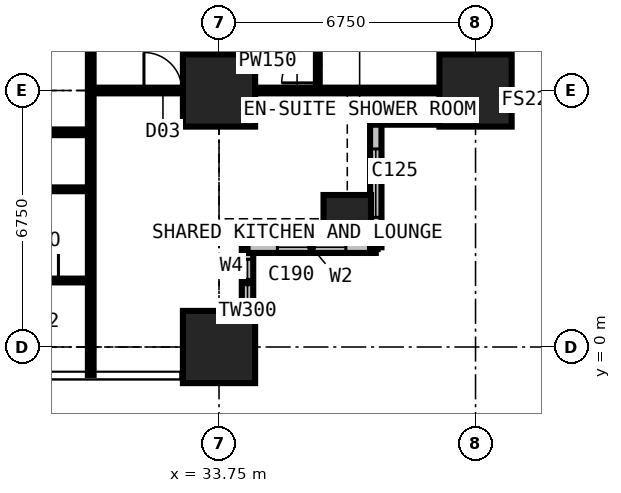
"""IFC4 building model, lengths in metres.
Left out: names, types, materials, properties, quantities, classifications, styles, units other than length and angle.
Written with IfcOpenShell. Run it as: python <this file> out.ifc"""

import sys

from ifc_helpers import new_model, si_unit, direction, frame, frame_2d, origin, origin_2d, place, context, subcontext, project, spatial, rectangle, extrude, element, fill, save


model = new_model("IFC4")
c1 = context("Model", 3, precision=1e-05, world=origin(), true_north=direction((0.0, 1.0)))
c2 = subcontext(c1, "Body", "Model", "MODEL_VIEW")
j1 = project(units=[si_unit("LENGTHUNIT", "METRE"), si_unit("PLANEANGLEUNIT", "RADIAN")], contexts=[c1])
p1 = place(None, origin())
s1 = spatial("IfcSite", under=j1, at=p1, CompositionType="ELEMENT")
p2 = place(p1, origin())
s2 = spatial("IfcBuilding", under=s1, at=p2, CompositionType="ELEMENT")
p3 = place(p2, frame((0.0, 0.0, 32.4)))
s3 = spatial("IfcBuildingStorey", under=s2, at=p3, CompositionType="ELEMENT", Elevation=32.4)
for number, where, z_axis, x_axis in (
    (1, (33.75, 0.0, 0.0), (0.0, 0.0, 1.0), (1.0, 0.0, 0.0)),
    (2, (33.75, 6.75, 0.0), (0.0, 0.0, 1.0), (1.0, 0.0, 0.0)),
):
    element("IfcColumn", number, at=place(p3, frame(where, z_axis=z_axis, x_axis=x_axis)), inside=s3, PredefinedType="COLUMN", context=c2, shape_type="SweptSolid", body=[
        extrude(rectangle(XDim=1.9, YDim=1.9, at=origin_2d()), origin(), (0.0, 0.0, 1.0), 3.6),
    ])
p4 = place(p3, frame((37.125, 3.375, 0.0), z_axis=(0.0, 0.0, 1.0), x_axis=(1.0, 0.0, 0.0)))
e3 = element("IfcColumn", 3, at=p4, inside=s3, PredefinedType="COLUMN", context=c2, shape_type="SweptSolid", body=[
    extrude(rectangle(XDim=1.25, YDim=1.25, at=origin_2d()), origin(), (0.0, 0.0, 1.0), 3.6),
])
p5 = place(p3, frame((40.5, 6.75, 0.0), z_axis=(0.0, 0.0, 1.0), x_axis=(1.0, 0.0, 0.0)))
e4 = element("IfcColumn", 4, at=p5, inside=s3, PredefinedType="COLUMN", context=c2, shape_type="SweptSolid", body=[
    extrude(rectangle(XDim=1.9, YDim=1.9, at=origin_2d()), origin(), (0.0, 0.0, 1.0), 3.6),
])
p6 = place(p3, frame((34.5, -0.75, 0.0), z_axis=(0.0, 0.0, 1.0), x_axis=(0.0, 1.0, 0.0)))
e5 = element("IfcWall", 5, at=p6, inside=s3, PredefinedType="SOLIDWALL", context=c2, shape_type="SweptSolid", body=[
    extrude(rectangle(XDim=3.375, YDim=0.3, at=frame_2d((1.688, 0.0))), origin(), (0.0, 0.0, 1.0), 3.375),
])
p7 = place(p6, frame((1.857, 0.0, 0.9)))
e6 = element("IfcOpeningElement", 6, at=p7, cuts=e5, PredefinedType="OPENING", context=c2, shape_type="SweptSolid", body=[
    extrude(rectangle(XDim=1.2, YDim=1.8, at=frame_2d((0.6, 0.9))), frame((0.0, 0.16, 0.0), z_axis=(0.0, -1.0, 0.0), x_axis=(1.0, 0.0, 0.0)), (0.0, 0.0, 1.0), 0.32),
])
p8 = place(p3, frame((34.5, 2.625, 0.0), z_axis=(0.0, 0.0, 1.0), x_axis=(1.0, 0.0, 0.0)))
e7 = element("IfcWall", 7, at=p8, inside=s3, PredefinedType="SOLIDWALL", context=c2, shape_type="SweptSolid", body=[
    extrude(rectangle(XDim=3.375, YDim=0.3, at=frame_2d((1.688, 0.0))), origin(), (0.0, 0.0, 1.0), 3.375),
])
p9 = place(p8, frame((0.788, 0.0, 0.6)))
e8 = element("IfcOpeningElement", 8, at=p9, cuts=e7, PredefinedType="OPENING", context=c2, shape_type="SweptSolid", body=[
    extrude(rectangle(XDim=1.8, YDim=2.1, at=frame_2d((0.9, 1.05))), frame((0.0, 0.16, 0.0), z_axis=(0.0, -1.0, 0.0), x_axis=(1.0, 0.0, 0.0)), (0.0, 0.0, 1.0), 0.32),
])
p10 = place(p3, frame((37.875, 2.625, 0.0), z_axis=(0.0, 0.0, 1.0), x_axis=(0.0, 1.0, 0.0)))
e9 = element("IfcWall", 9, at=p10, inside=s3, PredefinedType="SOLIDWALL", context=c2, shape_type="SweptSolid", body=[
    extrude(rectangle(XDim=3.375, YDim=0.3, at=frame_2d((1.688, 0.0))), origin(), (0.0, 0.0, 1.0), 3.375),
])
p11 = place(p10, frame((0.788, 0.0, 0.6)))
e10 = element("IfcOpeningElement", 10, at=p11, cuts=e9, PredefinedType="OPENING", context=c2, shape_type="SweptSolid", body=[
    extrude(rectangle(XDim=1.8, YDim=2.1, at=frame_2d((0.9, 1.05))), frame((0.0, 0.16, 0.0), z_axis=(0.0, -1.0, 0.0), x_axis=(1.0, 0.0, 0.0)), (0.0, 0.0, 1.0), 0.32),
])
p12 = place(p3, frame((37.875, 6.0, 0.0), z_axis=(0.0, 0.0, 1.0), x_axis=(1.0, 0.0, 0.0)))
e11 = element("IfcWall", 11, at=p12, inside=s3, PredefinedType="SOLIDWALL", context=c2, shape_type="SweptSolid", body=[
    extrude(rectangle(XDim=3.375, YDim=0.3, at=frame_2d((1.688, 0.0))), origin(), (0.0, 0.0, 1.0), 3.375),
])
p13 = place(p12, frame((0.317, 0.0, 0.9)))
e12 = element("IfcOpeningElement", 12, at=p13, cuts=e11, PredefinedType="OPENING", context=c2, shape_type="SweptSolid", body=[
    extrude(rectangle(XDim=1.2, YDim=1.8, at=frame_2d((0.6, 0.9))), frame((0.0, 0.16, 0.0), z_axis=(0.0, -1.0, 0.0), x_axis=(1.0, 0.0, 0.0)), (0.0, 0.0, 1.0), 0.32),
])
p14 = place(p3, frame((6.75, 4.15, 0.0), z_axis=(0.0, 0.0, 1.0), x_axis=(1.0, 0.0, 0.0)))
e13 = element("IfcWall", 13, at=p14, inside=s3, PredefinedType="PARTITIONING", context=c2, shape_type="SweptSolid", body=[
    extrude(rectangle(XDim=23.625, YDim=0.1, at=frame_2d((11.812, 0.0))), origin(), (0.0, 0.0, 1.0), 3.375),
])
p15 = place(p14, frame((2.85, 0.0, 0.0)))
e14 = element("IfcOpeningElement", 14, at=p15, cuts=e13, PredefinedType="OPENING", context=c2, shape_type="SweptSolid", body=[
    extrude(rectangle(XDim=1.0, YDim=2.2, at=frame_2d((0.5, 1.1))), frame((0.0, 0.06, 0.0), z_axis=(0.0, -1.0, 0.0), x_axis=(1.0, 0.0, 0.0)), (0.0, 0.0, 1.0), 0.12),
])
p16 = place(p14, frame((6.95, 0.0, 0.0)))
e15 = element("IfcOpeningElement", 15, at=p16, cuts=e13, PredefinedType="OPENING", context=c2, shape_type="SweptSolid", body=[
    extrude(rectangle(XDim=0.95, YDim=2.2, at=frame_2d((0.475, 1.1))), frame((0.0, 0.06, 0.0), z_axis=(0.0, -1.0, 0.0), x_axis=(1.0, 0.0, 0.0)), (0.0, 0.0, 1.0), 0.12),
])
p17 = place(p14, frame((10.375, 0.0, 0.0)))
e16 = element("IfcOpeningElement", 16, at=p17, cuts=e13, PredefinedType="OPENING", context=c2, shape_type="SweptSolid", body=[
    extrude(rectangle(XDim=0.95, YDim=2.2, at=frame_2d((0.475, 1.1))), frame((0.0, 0.06, 0.0), z_axis=(0.0, -1.0, 0.0), x_axis=(1.0, 0.0, 0.0)), (0.0, 0.0, 1.0), 0.12),
])
p18 = place(p14, frame((18.475, 0.0, 0.0)))
e17 = element("IfcOpeningElement", 17, at=p18, cuts=e13, PredefinedType="OPENING", context=c2, shape_type="SweptSolid", body=[
    extrude(rectangle(XDim=0.95, YDim=2.2, at=frame_2d((0.475, 1.1))), frame((0.0, 0.06, 0.0), z_axis=(0.0, -1.0, 0.0), x_axis=(1.0, 0.0, 0.0)), (0.0, 0.0, 1.0), 0.12),
])
p19 = place(p14, frame((13.7, 0.0, 0.0)))
e18 = element("IfcOpeningElement", 18, at=p19, cuts=e13, PredefinedType="OPENING", context=c2, shape_type="SweptSolid", body=[
    extrude(rectangle(XDim=0.95, YDim=2.2, at=frame_2d((0.475, 1.1))), frame((0.0, 0.06, 0.0), z_axis=(0.0, -1.0, 0.0), x_axis=(1.0, 0.0, 0.0)), (0.0, 0.0, 1.0), 0.12),
])
p20 = place(p3, frame((22.988, 5.65, 0.0), z_axis=(0.0, 0.0, 1.0), x_axis=(1.0, 0.0, 0.0)))
e19 = element("IfcWall", 19, at=p20, inside=s3, PredefinedType="PARTITIONING", context=c2, shape_type="SweptSolid", body=[
    extrude(rectangle(XDim=7.387, YDim=0.15, at=frame_2d((3.694, 0.0))), origin(), (0.0, 0.0, 1.0), 3.375),
])
p21 = place(p20, frame((2.1, 0.0, 0.0)))
e20 = element("IfcOpeningElement", 20, at=p21, cuts=e19, PredefinedType="OPENING", context=c2, shape_type="SweptSolid", body=[
    extrude(rectangle(XDim=0.95, YDim=2.2, at=frame_2d((0.475, 1.1))), frame((0.0, 0.085, 0.0), z_axis=(0.0, -1.0, 0.0), x_axis=(1.0, 0.0, 0.0)), (0.0, 0.0, 1.0), 0.17),
])
p22 = place(p3, frame((27.775, 1.75, 0.0), z_axis=(0.0, 0.0, 1.0), x_axis=(1.0, 0.0, 0.0)))
e21 = element("IfcWall", 21, at=p22, inside=s3, PredefinedType="PARTITIONING", context=c2, shape_type="SweptSolid", body=[
    extrude(rectangle(XDim=2.6, YDim=0.1, at=frame_2d((1.3, 0.0))), origin(), (0.0, 0.0, 1.0), 3.375),
])
p23 = place(p22, frame((0.85, 0.0, 0.0)))
e22 = element("IfcOpeningElement", 22, at=p23, cuts=e21, PredefinedType="OPENING", context=c2, shape_type="SweptSolid", body=[
    extrude(rectangle(XDim=0.9, YDim=2.2, at=frame_2d((0.45, 1.1))), frame((0.0, 0.06, 0.0), z_axis=(0.0, -1.0, 0.0), x_axis=(1.0, 0.0, 0.0)), (0.0, 0.0, 1.0), 0.12),
])
p24 = place(p3, frame((30.375, -0.734, 0.0), z_axis=(0.0, 0.0, 1.0), x_axis=(0.0, 1.0, 0.0)))
e23 = element("IfcWall", 23, at=p24, inside=s3, PredefinedType="PARTITIONING", context=c2, shape_type="SweptSolid", body=[
    extrude(rectangle(XDim=12.034, YDim=0.15, at=frame_2d((6.017, 0.0))), origin(), (0.0, 0.0, 1.0), 3.375),
])
p25 = place(p3, frame((30.375, 6.75, 0.0), z_axis=(0.0, 0.0, 1.0), x_axis=(1.0, 0.0, 0.0)))
e24 = element("IfcWall", 24, at=p25, inside=s3, PredefinedType="PARTITIONING", context=c2, shape_type="SweptSolid", body=[
    extrude(rectangle(XDim=10.859, YDim=0.15, at=frame_2d((5.429, 0.0))), origin(), (0.0, 0.0, 1.0), 2.877),
])
p26 = place(p25, frame((1.4, 0.0, 0.0)))
e25 = element("IfcOpeningElement", 25, at=p26, cuts=e24, PredefinedType="OPENING", context=c2, shape_type="SweptSolid", body=[
    extrude(rectangle(XDim=1.0, YDim=2.2, at=frame_2d((0.5, 1.1))), frame((0.0, 0.085, 0.0), z_axis=(0.0, -1.0, 0.0), x_axis=(1.0, 0.0, 0.0)), (0.0, 0.0, 1.0), 0.17),
])
p27 = place(p3, frame((36.35, 6.75, 0.0), z_axis=(0.0, 0.0, 1.0), x_axis=(0.0, 1.0, 0.0)))
e26 = element("IfcWall", 26, at=p27, inside=s3, PredefinedType="PARTITIONING", context=c2, shape_type="SweptSolid", body=[
    extrude(rectangle(XDim=23.625, YDim=0.1, at=frame_2d((11.812, 0.0))), origin(), (0.0, 0.0, 1.0), 3.375),
])
p28 = place(p27, frame((0.2, 0.0, 0.0)))
e27 = element("IfcOpeningElement", 27, at=p28, cuts=e26, PredefinedType="OPENING", context=c2, shape_type="SweptSolid", body=[
    extrude(rectangle(XDim=0.95, YDim=2.2, at=frame_2d((0.475, 1.1))), frame((0.0, 0.06, 0.0), z_axis=(0.0, -1.0, 0.0), x_axis=(1.0, 0.0, 0.0)), (0.0, 0.0, 1.0), 0.12),
])
p29 = place(p27, frame((3.575, 0.0, 0.0)))
e28 = element("IfcOpeningElement", 28, at=p29, cuts=e26, PredefinedType="OPENING", context=c2, shape_type="SweptSolid", body=[
    extrude(rectangle(XDim=0.95, YDim=2.2, at=frame_2d((0.475, 1.1))), frame((0.0, 0.06, 0.0), z_axis=(0.0, -1.0, 0.0), x_axis=(1.0, 0.0, 0.0)), (0.0, 0.0, 1.0), 0.12),
])
p30 = place(p27, frame((7.0, 0.0, 0.0)))
e29 = element("IfcOpeningElement", 29, at=p30, cuts=e26, PredefinedType="OPENING", context=c2, shape_type="SweptSolid", body=[
    extrude(rectangle(XDim=0.95, YDim=2.2, at=frame_2d((0.475, 1.1))), frame((0.0, 0.06, 0.0), z_axis=(0.0, -1.0, 0.0), x_axis=(1.0, 0.0, 0.0)), (0.0, 0.0, 1.0), 0.12),
])
p31 = place(p27, frame((10.375, 0.0, 0.0)))
e30 = element("IfcOpeningElement", 30, at=p31, cuts=e26, PredefinedType="OPENING", context=c2, shape_type="SweptSolid", body=[
    extrude(rectangle(XDim=0.95, YDim=2.2, at=frame_2d((0.475, 1.1))), frame((0.0, 0.06, 0.0), z_axis=(0.0, -1.0, 0.0), x_axis=(1.0, 0.0, 0.0)), (0.0, 0.0, 1.0), 0.12),
])
p32 = place(p27, frame((13.75, 0.0, 0.0)))
e31 = element("IfcOpeningElement", 31, at=p32, cuts=e26, PredefinedType="OPENING", context=c2, shape_type="SweptSolid", body=[
    extrude(rectangle(XDim=0.95, YDim=2.2, at=frame_2d((0.475, 1.1))), frame((0.0, 0.06, 0.0), z_axis=(0.0, -1.0, 0.0), x_axis=(1.0, 0.0, 0.0)), (0.0, 0.0, 1.0), 0.12),
])
p33 = place(p27, frame((17.125, 0.0, 0.0)))
e32 = element("IfcOpeningElement", 32, at=p33, cuts=e26, PredefinedType="OPENING", context=c2, shape_type="SweptSolid", body=[
    extrude(rectangle(XDim=0.95, YDim=2.2, at=frame_2d((0.475, 1.1))), frame((0.0, 0.06, 0.0), z_axis=(0.0, -1.0, 0.0), x_axis=(1.0, 0.0, 0.0)), (0.0, 0.0, 1.0), 0.12),
])
p34 = place(p27, frame((20.5, 0.0, 0.0)))
e33 = element("IfcOpeningElement", 33, at=p34, cuts=e26, PredefinedType="OPENING", context=c2, shape_type="SweptSolid", body=[
    extrude(rectangle(XDim=0.95, YDim=2.2, at=frame_2d((0.475, 1.1))), frame((0.0, 0.06, 0.0), z_axis=(0.0, -1.0, 0.0), x_axis=(1.0, 0.0, 0.0)), (0.0, 0.0, 1.0), 0.12),
])
p35 = place(p7, origin())
e34 = element("IfcWindow", 34, at=p35, inside=s3, PartitioningType="SINGLE_PANEL", PredefinedType="WINDOW", context=c2, shape_type="SweptSolid", body=[
    extrude(rectangle(XDim=1.2, YDim=1.8, at=frame_2d((0.6, 0.9))), frame((0.0, 0.03, 0.0), z_axis=(0.0, -1.0, 0.0), x_axis=(1.0, 0.0, 0.0)), (0.0, 0.0, 1.0), 0.06),
])
fill(e6, e34)
p36 = place(p9, origin())
e35 = element("IfcWindow", 35, at=p36, inside=s3, PartitioningType="SINGLE_PANEL", PredefinedType="WINDOW", context=c2, shape_type="SweptSolid", body=[
    extrude(rectangle(XDim=1.8, YDim=2.1, at=frame_2d((0.9, 1.05))), frame((0.0, 0.03, 0.0), z_axis=(0.0, -1.0, 0.0), x_axis=(1.0, 0.0, 0.0)), (0.0, 0.0, 1.0), 0.06),
])
fill(e8, e35)
p37 = place(p11, origin())
e36 = element("IfcWindow", 36, at=p37, inside=s3, PartitioningType="SINGLE_PANEL", PredefinedType="WINDOW", context=c2, shape_type="SweptSolid", body=[
    extrude(rectangle(XDim=1.8, YDim=2.1, at=frame_2d((0.9, 1.05))), frame((0.0, 0.03, 0.0), z_axis=(0.0, -1.0, 0.0), x_axis=(1.0, 0.0, 0.0)), (0.0, 0.0, 1.0), 0.06),
])
fill(e10, e36)
p38 = place(p13, origin())
e37 = element("IfcWindow", 37, at=p38, inside=s3, PartitioningType="SINGLE_PANEL", PredefinedType="WINDOW", context=c2, shape_type="SweptSolid", body=[
    extrude(rectangle(XDim=1.2, YDim=1.8, at=frame_2d((0.6, 0.9))), frame((0.0, 0.03, 0.0), z_axis=(0.0, -1.0, 0.0), x_axis=(1.0, 0.0, 0.0)), (0.0, 0.0, 1.0), 0.06),
])
fill(e12, e37)
p39 = place(p23, origin())
e38 = element("IfcDoor", 38, at=p39, inside=s3, OperationType="SINGLE_SWING_RIGHT", PredefinedType="DOOR", context=c2, shape_type="SweptSolid", body=[
    extrude(rectangle(XDim=0.9, YDim=2.2, at=frame_2d((0.45, 1.1))), frame((0.0, 0.025, 0.0), z_axis=(0.0, -1.0, 0.0), x_axis=(1.0, 0.0, 0.0)), (0.0, 0.0, 1.0), 0.05),
])
fill(e22, e38)
p40 = place(p26, origin())
e39 = element("IfcDoor", 39, at=p40, inside=s3, OperationType="SINGLE_SWING_LEFT", PredefinedType="DOOR", context=c2, shape_type="SweptSolid", body=[
    extrude(rectangle(XDim=1.0, YDim=2.2, at=frame_2d((0.5, 1.1))), frame((0.0, 0.025, 0.0), z_axis=(0.0, -1.0, 0.0), x_axis=(1.0, 0.0, 0.0)), (0.0, 0.0, 1.0), 0.05),
])
fill(e25, e39)
p41 = place(p28, origin())
e40 = element("IfcDoor", 40, at=p41, inside=s3, OperationType="SINGLE_SWING_LEFT", PredefinedType="DOOR", context=c2, shape_type="SweptSolid", body=[
    extrude(rectangle(XDim=0.95, YDim=2.2, at=frame_2d((0.475, 1.1))), frame((0.0, 0.025, 0.0), z_axis=(0.0, -1.0, 0.0), x_axis=(1.0, 0.0, 0.0)), (0.0, 0.0, 1.0), 0.05),
])
fill(e27, e40)
save(model, sys.argv[1])
